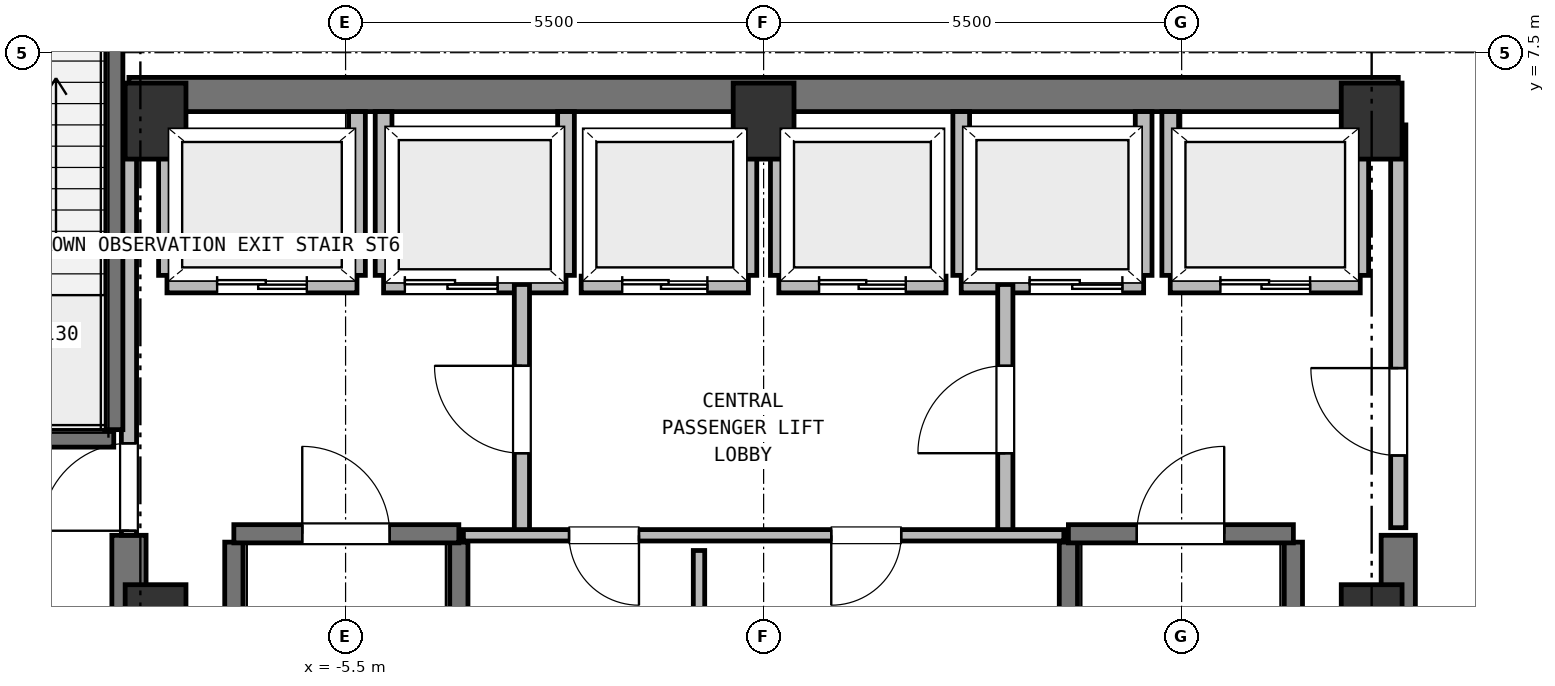
"""IFC4 building model, lengths in metres.
Left out: names, types, materials, properties, quantities, classifications, styles, units other than length and angle.
Written with IfcOpenShell. Run it as: python <this file> out.ifc"""

import sys

from ifc_helpers import new_model, si_unit, direction, frame, frame_2d, origin, origin_2d, place, context, subcontext, project, spatial, rectangle, extrude, element, fill, save


model = new_model("IFC4")
c1 = context("Model", 3, precision=1e-05, world=origin(), true_north=direction((0.0, 1.0)))
c2 = subcontext(c1, "Body", "Model", "MODEL_VIEW")
j1 = project(units=[si_unit("LENGTHUNIT", "METRE"), si_unit("PLANEANGLEUNIT", "RADIAN")], contexts=[c1])
p1 = place(None, origin())
s1 = spatial("IfcSite", under=j1, at=p1, CompositionType="ELEMENT")
p2 = place(p1, origin())
s2 = spatial("IfcBuilding", under=s1, at=p2, CompositionType="ELEMENT")
p3 = place(p2, frame((0.0, 0.0, 277.2)))
s3 = spatial("IfcBuildingStorey", under=s2, at=p3, CompositionType="ELEMENT", Elevation=277.2)
for number, where, z_axis, x_axis in (
    (1, (8.0, 0.0, 0.0), (0.0, 0.0, 1.0), (1.0, 0.0, 0.0)),
    (2, (8.0, 6.6, 0.0), (0.0, 0.0, 1.0), (1.0, 0.0, 0.0)),
    (3, (0.0, 6.6, 0.0), (0.0, 0.0, 1.0), (1.0, 0.0, 0.0)),
    (4, (-8.0, 6.6, 0.0), (0.0, 0.0, 1.0), (1.0, 0.0, 0.0)),
    (5, (-8.0, 0.0, 0.0), (0.0, 0.0, 1.0), (1.0, 0.0, 0.0)),
):
    element("IfcColumn", number, at=place(p3, frame(where, z_axis=z_axis, x_axis=x_axis)), inside=s3, PredefinedType="COLUMN", context=c2, shape_type="SweptSolid", body=[
        extrude(rectangle(XDim=0.8, YDim=1.0, at=origin_2d()), origin(), (0.0, 0.0, 1.0), 4.4),
    ])
p4 = place(p3, frame((-8.35, 6.95, 0.0), z_axis=(0.0, 0.0, 1.0), x_axis=(1.0, 0.0, 0.0)))
e6 = element("IfcWall", 6, at=p4, inside=s3, PredefinedType="SHEAR", context=c2, shape_type="SweptSolid", body=[
    extrude(rectangle(XDim=16.7, YDim=0.45, at=frame_2d((8.35, 0.0))), origin(), (0.0, 0.0, 1.0), 4.15),
])
for number, where, z_axis, x_axis in (
    (7, (-8.35, -6.95, 0.0), (0.0, 0.0, 1.0), (0.0, 1.0, 0.0)),
    (8, (8.35, -6.95, 0.0), (0.0, 0.0, 1.0), (0.0, 1.0, 0.0)),
):
    element("IfcWall", number, at=place(p3, frame(where, z_axis=z_axis, x_axis=x_axis)), inside=s3, PredefinedType="SHEAR", context=c2, shape_type="SweptSolid", body=[
        extrude(rectangle(XDim=8.1, YDim=0.45, at=frame_2d((4.05, 0.0))), origin(), (0.0, 0.0, 1.0), 4.15),
    ])
for number, where, z_axis, x_axis in (
    (9, (-6.97, -6.16, 0.0), (0.0, 0.0, 1.0), (0.0, 1.0, 0.0)),
    (10, (-4.01, -6.16, 0.0), (0.0, 0.0, 1.0), (0.0, 1.0, 0.0)),
):
    element("IfcWall", number, at=place(p3, frame(where, z_axis=z_axis, x_axis=x_axis)), inside=s3, PredefinedType="SHEAR", context=c2, shape_type="SweptSolid", body=[
        extrude(rectangle(XDim=7.22, YDim=0.24, at=frame_2d((3.61, 0.0))), origin(), (0.0, 0.0, 1.0), 4.15),
    ])
p5 = place(p3, frame((-6.97, 1.17, 0.0), z_axis=(0.0, 0.0, 1.0), x_axis=(1.0, 0.0, 0.0)))
e11 = element("IfcWall", 11, at=p5, inside=s3, PredefinedType="SHEAR", context=c2, shape_type="SweptSolid", body=[
    extrude(rectangle(XDim=2.96, YDim=0.24, at=frame_2d((1.48, 0.0))), origin(), (0.0, 0.0, 1.0), 4.15),
])
p6 = place(p5, frame((0.9, 0.0, 0.0)))
e12 = element("IfcOpeningElement", 12, at=p6, cuts=e11, PredefinedType="OPENING", context=c2, shape_type="SweptSolid", body=[
    extrude(rectangle(XDim=1.15, YDim=2.15, at=frame_2d((0.575, 1.075))), frame((0.0, 0.13, 0.0), z_axis=(0.0, -1.0, 0.0), x_axis=(1.0, 0.0, 0.0)), (0.0, 0.0, 1.0), 0.26),
])
for number, where, z_axis, x_axis in (
    (13, (4.01, -6.16, 0.0), (0.0, 0.0, 1.0), (0.0, 1.0, 0.0)),
    (14, (6.97, -6.16, 0.0), (0.0, 0.0, 1.0), (0.0, 1.0, 0.0)),
):
    element("IfcWall", number, at=place(p3, frame(where, z_axis=z_axis, x_axis=x_axis)), inside=s3, PredefinedType="SHEAR", context=c2, shape_type="SweptSolid", body=[
        extrude(rectangle(XDim=7.22, YDim=0.24, at=frame_2d((3.61, 0.0))), origin(), (0.0, 0.0, 1.0), 4.15),
    ])
p7 = place(p3, frame((4.01, 1.17, 0.0), z_axis=(0.0, 0.0, 1.0), x_axis=(1.0, 0.0, 0.0)))
e15 = element("IfcWall", 15, at=p7, inside=s3, PredefinedType="SHEAR", context=c2, shape_type="SweptSolid", body=[
    extrude(rectangle(XDim=2.96, YDim=0.24, at=frame_2d((1.48, 0.0))), origin(), (0.0, 0.0, 1.0), 4.15),
])
p8 = place(p7, frame((0.9, 0.0, 0.0)))
e16 = element("IfcOpeningElement", 16, at=p8, cuts=e15, PredefinedType="OPENING", context=c2, shape_type="SweptSolid", body=[
    extrude(rectangle(XDim=1.15, YDim=2.15, at=frame_2d((0.575, 1.075))), frame((0.0, 0.13, 0.0), z_axis=(0.0, -1.0, 0.0), x_axis=(1.0, 0.0, 0.0)), (0.0, 0.0, 1.0), 0.26),
])
p9 = place(p3, frame((-7.85, 4.45, 0.0), z_axis=(0.0, 0.0, 1.0), x_axis=(1.0, 0.0, 0.0)))
e17 = element("IfcWall", 17, at=p9, inside=s3, PredefinedType="PARTITIONING", context=c2, shape_type="SweptSolid", body=[
    extrude(rectangle(XDim=2.5, YDim=0.22, at=frame_2d((1.25, 0.0))), origin(), (0.0, 0.0, 1.0), 4.15),
])
p10 = place(p9, frame((0.66, 0.0, 0.0)))
e18 = element("IfcOpeningElement", 18, at=p10, cuts=e17, PredefinedType="OPENING", context=c2, shape_type="SweptSolid", body=[
    extrude(rectangle(XDim=1.18, YDim=2.15, at=frame_2d((0.59, 1.075))), frame((0.0, 0.12, 0.0), z_axis=(0.0, -1.0, 0.0), x_axis=(1.0, 0.0, 0.0)), (0.0, 0.0, 1.0), 0.24),
])
p11 = place(p3, frame((-7.85, 4.57, 0.0), z_axis=(0.0, 0.0, 1.0), x_axis=(0.0, 1.0, 0.0)))
e19 = element("IfcWall", 19, at=p11, inside=s3, PredefinedType="PARTITIONING", context=c2, shape_type="SweptSolid", body=[
    extrude(rectangle(XDim=2.155, YDim=0.22, at=frame_2d((1.078, 0.0))), origin(), (0.0, 0.0, 1.0), 3.83),
])
p12 = place(p3, frame((-5.35, 4.57, 0.0), z_axis=(0.0, 0.0, 1.0), x_axis=(0.0, 1.0, 0.0)))
e20 = element("IfcWall", 20, at=p12, inside=s3, PredefinedType="PARTITIONING", context=c2, shape_type="SweptSolid", body=[
    extrude(rectangle(XDim=2.155, YDim=0.22, at=frame_2d((1.078, 0.0))), origin(), (0.0, 0.0, 1.0), 4.15),
])
p13 = place(p3, frame((5.35, 4.45, 0.0), z_axis=(0.0, 0.0, 1.0), x_axis=(1.0, 0.0, 0.0)))
e21 = element("IfcWall", 21, at=p13, inside=s3, PredefinedType="PARTITIONING", context=c2, shape_type="SweptSolid", body=[
    extrude(rectangle(XDim=2.5, YDim=0.22, at=frame_2d((1.25, 0.0))), origin(), (0.0, 0.0, 1.0), 4.15),
])
p14 = place(p13, frame((0.66, 0.0, 0.0)))
e22 = element("IfcOpeningElement", 22, at=p14, cuts=e21, PredefinedType="OPENING", context=c2, shape_type="SweptSolid", body=[
    extrude(rectangle(XDim=1.18, YDim=2.15, at=frame_2d((0.59, 1.075))), frame((0.0, 0.12, 0.0), z_axis=(0.0, -1.0, 0.0), x_axis=(1.0, 0.0, 0.0)), (0.0, 0.0, 1.0), 0.24),
])
p15 = place(p3, frame((5.35, 4.57, 0.0), z_axis=(0.0, 0.0, 1.0), x_axis=(0.0, 1.0, 0.0)))
e23 = element("IfcWall", 23, at=p15, inside=s3, PredefinedType="PARTITIONING", context=c2, shape_type="SweptSolid", body=[
    extrude(rectangle(XDim=2.155, YDim=0.22, at=frame_2d((1.078, 0.0))), origin(), (0.0, 0.0, 1.0), 4.15),
])
p16 = place(p3, frame((7.85, 4.57, 0.0), z_axis=(0.0, 0.0, 1.0), x_axis=(0.0, 1.0, 0.0)))
e24 = element("IfcWall", 24, at=p16, inside=s3, PredefinedType="PARTITIONING", context=c2, shape_type="SweptSolid", body=[
    extrude(rectangle(XDim=2.155, YDim=0.22, at=frame_2d((1.078, 0.0))), origin(), (0.0, 0.0, 1.0), 3.83),
])
p17 = place(p3, frame((-5.0, 4.45, 0.0), z_axis=(0.0, 0.0, 1.0), x_axis=(1.0, 0.0, 0.0)))
e25 = element("IfcWall", 25, at=p17, inside=s3, PredefinedType="PARTITIONING", context=c2, shape_type="SweptSolid", body=[
    extrude(rectangle(XDim=2.4, YDim=0.22, at=frame_2d((1.2, 0.0))), origin(), (0.0, 0.0, 1.0), 4.15),
])
p18 = place(p17, frame((0.28, 0.0, 0.0)))
e26 = element("IfcOpeningElement", 26, at=p18, cuts=e25, PredefinedType="OPENING", context=c2, shape_type="SweptSolid", body=[
    extrude(rectangle(XDim=1.22, YDim=2.15, at=frame_2d((0.61, 1.075))), frame((0.0, 0.12, 0.0), z_axis=(0.0, -1.0, 0.0), x_axis=(1.0, 0.0, 0.0)), (0.0, 0.0, 1.0), 0.24),
])
for number, where, z_axis, x_axis in (
    (27, (-5.0, 4.57, 0.0), (0.0, 0.0, 1.0), (0.0, 1.0, 0.0)),
    (28, (-2.6, 4.57, 0.0), (0.0, 0.0, 1.0), (0.0, 1.0, 0.0)),
):
    element("IfcWall", number, at=place(p3, frame(where, z_axis=z_axis, x_axis=x_axis)), inside=s3, PredefinedType="PARTITIONING", context=c2, shape_type="SweptSolid", body=[
        extrude(rectangle(XDim=2.155, YDim=0.22, at=frame_2d((1.078, 0.0))), origin(), (0.0, 0.0, 1.0), 4.15),
    ])
p19 = place(p3, frame((2.6, 4.45, 0.0), z_axis=(0.0, 0.0, 1.0), x_axis=(1.0, 0.0, 0.0)))
e29 = element("IfcWall", 29, at=p19, inside=s3, PredefinedType="PARTITIONING", context=c2, shape_type="SweptSolid", body=[
    extrude(rectangle(XDim=2.4, YDim=0.22, at=frame_2d((1.2, 0.0))), origin(), (0.0, 0.0, 1.0), 4.15),
])
p20 = place(p19, frame((0.9, 0.0, 0.0)))
e30 = element("IfcOpeningElement", 30, at=p20, cuts=e29, PredefinedType="OPENING", context=c2, shape_type="SweptSolid", body=[
    extrude(rectangle(XDim=1.22, YDim=2.15, at=frame_2d((0.61, 1.075))), frame((0.0, 0.12, 0.0), z_axis=(0.0, -1.0, 0.0), x_axis=(1.0, 0.0, 0.0)), (0.0, 0.0, 1.0), 0.24),
])
for number, where, z_axis, x_axis in (
    (31, (2.6, 4.57, 0.0), (0.0, 0.0, 1.0), (0.0, 1.0, 0.0)),
    (32, (5.0, 4.57, 0.0), (0.0, 0.0, 1.0), (0.0, 1.0, 0.0)),
):
    element("IfcWall", number, at=place(p3, frame(where, z_axis=z_axis, x_axis=x_axis)), inside=s3, PredefinedType="PARTITIONING", context=c2, shape_type="SweptSolid", body=[
        extrude(rectangle(XDim=2.155, YDim=0.22, at=frame_2d((1.078, 0.0))), origin(), (0.0, 0.0, 1.0), 4.15),
    ])
p21 = place(p3, frame((-2.4, 4.45, 0.0), z_axis=(0.0, 0.0, 1.0), x_axis=(1.0, 0.0, 0.0)))
e33 = element("IfcWall", 33, at=p21, inside=s3, PredefinedType="PARTITIONING", context=c2, shape_type="SweptSolid", body=[
    extrude(rectangle(XDim=2.2, YDim=0.22, at=frame_2d((1.1, 0.0))), origin(), (0.0, 0.0, 1.0), 4.15),
])
p22 = place(p21, frame((0.54, 0.0, 0.0)))
e34 = element("IfcOpeningElement", 34, at=p22, cuts=e33, PredefinedType="OPENING", context=c2, shape_type="SweptSolid", body=[
    extrude(rectangle(XDim=1.12, YDim=2.15, at=frame_2d((0.56, 1.075))), frame((0.0, 0.12, 0.0), z_axis=(0.0, -1.0, 0.0), x_axis=(1.0, 0.0, 0.0)), (0.0, 0.0, 1.0), 0.24),
])
p23 = place(p3, frame((-0.2, 4.57, 0.0), z_axis=(0.0, 0.0, 1.0), x_axis=(0.0, 1.0, 0.0)))
e35 = element("IfcWall", 35, at=p23, inside=s3, PredefinedType="PARTITIONING", context=c2, shape_type="SweptSolid", body=[
    extrude(rectangle(XDim=2.155, YDim=0.22, at=frame_2d((1.078, 0.0))), origin(), (0.0, 0.0, 1.0), 4.15),
])
p24 = place(p3, frame((0.2, 4.45, 0.0), z_axis=(0.0, 0.0, 1.0), x_axis=(1.0, 0.0, 0.0)))
e36 = element("IfcWall", 36, at=p24, inside=s3, PredefinedType="PARTITIONING", context=c2, shape_type="SweptSolid", body=[
    extrude(rectangle(XDim=2.2, YDim=0.22, at=frame_2d((1.1, 0.0))), origin(), (0.0, 0.0, 1.0), 4.15),
])
p25 = place(p24, frame((0.53, 0.0, 0.0)))
e37 = element("IfcOpeningElement", 37, at=p25, cuts=e36, PredefinedType="OPENING", context=c2, shape_type="SweptSolid", body=[
    extrude(rectangle(XDim=1.14, YDim=2.15, at=frame_2d((0.57, 1.075))), frame((0.0, 0.12, 0.0), z_axis=(0.0, -1.0, 0.0), x_axis=(1.0, 0.0, 0.0)), (0.0, 0.0, 1.0), 0.24),
])
p26 = place(p3, frame((0.2, 4.57, 0.0), z_axis=(0.0, 0.0, 1.0), x_axis=(0.0, 1.0, 0.0)))
e38 = element("IfcWall", 38, at=p26, inside=s3, PredefinedType="PARTITIONING", context=c2, shape_type="SweptSolid", body=[
    extrude(rectangle(XDim=2.155, YDim=0.22, at=frame_2d((1.078, 0.0))), origin(), (0.0, 0.0, 1.0), 4.15),
])
p27 = place(p3, frame((-3.18, 1.15, 0.0), z_axis=(0.0, 0.0, 1.0), x_axis=(0.0, 1.0, 0.0)))
e39 = element("IfcWall", 39, at=p27, inside=s3, PredefinedType="PARTITIONING", context=c2, shape_type="SweptSolid", body=[
    extrude(rectangle(XDim=3.3, YDim=0.2, at=frame_2d((1.65, 0.0))), origin(), (0.0, 0.0, 1.0), 4.15),
])
p28 = place(p27, frame((1.08, 0.0, 0.0)))
e40 = element("IfcOpeningElement", 40, at=p28, cuts=e39, PredefinedType="OPENING", context=c2, shape_type="SweptSolid", body=[
    extrude(rectangle(XDim=1.15, YDim=2.15, at=frame_2d((0.575, 1.075))), frame((0.0, 0.11, 0.0), z_axis=(0.0, -1.0, 0.0), x_axis=(1.0, 0.0, 0.0)), (0.0, 0.0, 1.0), 0.22),
])
p29 = place(p3, frame((3.18, 1.15, 0.0), z_axis=(0.0, 0.0, 1.0), x_axis=(0.0, 1.0, 0.0)))
e41 = element("IfcWall", 41, at=p29, inside=s3, PredefinedType="PARTITIONING", context=c2, shape_type="SweptSolid", body=[
    extrude(rectangle(XDim=3.3, YDim=0.2, at=frame_2d((1.65, 0.0))), origin(), (0.0, 0.0, 1.0), 4.15),
])
p30 = place(p29, frame((1.08, 0.0, 0.0)))
e42 = element("IfcOpeningElement", 42, at=p30, cuts=e41, PredefinedType="OPENING", context=c2, shape_type="SweptSolid", body=[
    extrude(rectangle(XDim=1.15, YDim=2.15, at=frame_2d((0.575, 1.075))), frame((0.0, 0.11, 0.0), z_axis=(0.0, -1.0, 0.0), x_axis=(1.0, 0.0, 0.0)), (0.0, 0.0, 1.0), 0.22),
])
p31 = place(p3, frame((-8.35, 1.15, 0.0), z_axis=(0.0, 0.0, 1.0), x_axis=(0.0, 1.0, 0.0)))
e43 = element("IfcWall", 43, at=p31, inside=s3, PredefinedType="PARTITIONING", context=c2, shape_type="SweptSolid", body=[
    extrude(rectangle(XDim=5.4, YDim=0.2, at=frame_2d((2.7, 0.0))), origin(), (0.0, 0.0, 1.0), 4.15),
])
p32 = place(p31, frame((0.06, 0.0, 0.0)))
e44 = element("IfcOpeningElement", 44, at=p32, cuts=e43, PredefinedType="OPENING", context=c2, shape_type="SweptSolid", body=[
    extrude(rectangle(XDim=1.15, YDim=2.15, at=frame_2d((0.575, 1.075))), frame((0.0, 0.11, 0.0), z_axis=(0.0, -1.0, 0.0), x_axis=(1.0, 0.0, 0.0)), (0.0, 0.0, 1.0), 0.22),
])
p33 = place(p3, frame((8.35, 1.25, 0.0), z_axis=(0.0, 0.0, 1.0), x_axis=(0.0, 1.0, 0.0)))
e45 = element("IfcWall", 45, at=p33, inside=s3, PredefinedType="PARTITIONING", context=c2, shape_type="SweptSolid", body=[
    extrude(rectangle(XDim=5.3, YDim=0.2, at=frame_2d((2.65, 0.0))), origin(), (0.0, 0.0, 1.0), 4.15),
])
p34 = place(p33, frame((0.95, 0.0, 0.0)))
e46 = element("IfcOpeningElement", 46, at=p34, cuts=e45, PredefinedType="OPENING", context=c2, shape_type="SweptSolid", body=[
    extrude(rectangle(XDim=1.15, YDim=2.15, at=frame_2d((0.575, 1.075))), frame((0.0, 0.11, 0.0), z_axis=(0.0, -1.0, 0.0), x_axis=(1.0, 0.0, 0.0)), (0.0, 0.0, 1.0), 0.22),
])
p35 = place(p3, frame((3.95, 1.15, 0.0), z_axis=(0.0, 0.0, 1.0), x_axis=(-1.0, 0.0, 0.0)))
e47 = element("IfcWall", 47, at=p35, inside=s3, PredefinedType="PARTITIONING", context=c2, shape_type="SweptSolid", body=[
    extrude(rectangle(XDim=7.9, YDim=0.15, at=frame_2d((3.95, 0.0))), origin(), (0.0, 0.0, 1.0), 4.15),
])
p36 = place(p35, frame((5.59, 0.0, 0.0)))
e48 = element("IfcOpeningElement", 48, at=p36, cuts=e47, PredefinedType="OPENING", context=c2, shape_type="SweptSolid", body=[
    extrude(rectangle(XDim=0.92, YDim=2.05, at=frame_2d((0.46, 1.025))), frame((0.0, 0.085, 0.0), z_axis=(0.0, -1.0, 0.0), x_axis=(1.0, 0.0, 0.0)), (0.0, 0.0, 1.0), 0.17),
])
p37 = place(p35, frame((2.14, 0.0, 0.0)))
e49 = element("IfcOpeningElement", 49, at=p37, cuts=e47, PredefinedType="OPENING", context=c2, shape_type="SweptSolid", body=[
    extrude(rectangle(XDim=0.92, YDim=2.05, at=frame_2d((0.46, 1.025))), frame((0.0, 0.085, 0.0), z_axis=(0.0, -1.0, 0.0), x_axis=(1.0, 0.0, 0.0)), (0.0, 0.0, 1.0), 0.17),
])
p38 = place(p3, frame((-0.85, -6.58, 0.0), z_axis=(0.0, 0.0, 1.0), x_axis=(0.0, 1.0, 0.0)))
e50 = element("IfcWall", 50, at=p38, inside=s3, PredefinedType="PARTITIONING", context=c2, shape_type="SweptSolid", body=[
    extrude(rectangle(XDim=7.53, YDim=0.15, at=frame_2d((3.765, 0.0))), origin(), (0.0, 0.0, 1.0), 4.15),
])
p39 = place(p3, frame((-11.51, 2.43, 0.0), z_axis=(0.0, 0.0, 1.0), x_axis=(1.0, 0.0, 0.0)))
e51 = element("IfcWall", 51, at=p39, inside=s3, PredefinedType="SHEAR", context=c2, shape_type="SweptSolid", body=[
    extrude(rectangle(XDim=2.96, YDim=0.24, at=frame_2d((1.48, 0.0))), origin(), (0.0, 0.0, 1.0), 4.15),
])
p40 = place(p3, frame((-8.55, 2.54, 0.0), z_axis=(0.0, 0.0, 1.0), x_axis=(0.0, 1.0, 0.0)))
e52 = element("IfcWall", 52, at=p40, inside=s3, PredefinedType="SHEAR", context=c2, shape_type="SweptSolid", body=[
    extrude(rectangle(XDim=6.42, YDim=0.24, at=frame_2d((3.21, 0.0))), origin(), (0.0, 0.0, 1.0), 4.15),
])
p41 = place(p6, origin())
e53 = element("IfcDoor", 53, at=p41, inside=s3, OperationType="SINGLE_SWING_LEFT", PredefinedType="DOOR", context=c2, shape_type="SweptSolid", body=[
    extrude(rectangle(XDim=1.15, YDim=2.15, at=frame_2d((0.575, 1.075))), frame((0.0, 0.025, 0.0), z_axis=(0.0, -1.0, 0.0), x_axis=(1.0, 0.0, 0.0)), (0.0, 0.0, 1.0), 0.05),
])
fill(e12, e53)
p42 = place(p8, origin())
e54 = element("IfcDoor", 54, at=p42, inside=s3, OperationType="SINGLE_SWING_RIGHT", PredefinedType="DOOR", context=c2, shape_type="SweptSolid", body=[
    extrude(rectangle(XDim=1.15, YDim=2.15, at=frame_2d((0.575, 1.075))), frame((0.0, 0.025, 0.0), z_axis=(0.0, -1.0, 0.0), x_axis=(1.0, 0.0, 0.0)), (0.0, 0.0, 1.0), 0.05),
])
fill(e16, e54)
p43 = place(p10, origin())
e55 = element("IfcDoor", 55, at=p43, inside=s3, OperationType="DOUBLE_DOOR_SLIDING", PredefinedType="DOOR", context=c2, shape_type="SweptSolid", body=[
    extrude(rectangle(XDim=1.18, YDim=2.15, at=frame_2d((0.59, 1.075))), frame((0.0, 0.025, 0.0), z_axis=(0.0, -1.0, 0.0), x_axis=(1.0, 0.0, 0.0)), (0.0, 0.0, 1.0), 0.05),
])
fill(e18, e55)
p44 = place(p14, origin())
e56 = element("IfcDoor", 56, at=p44, inside=s3, OperationType="DOUBLE_DOOR_SLIDING", PredefinedType="DOOR", context=c2, shape_type="SweptSolid", body=[
    extrude(rectangle(XDim=1.18, YDim=2.15, at=frame_2d((0.59, 1.075))), frame((0.0, 0.025, 0.0), z_axis=(0.0, -1.0, 0.0), x_axis=(1.0, 0.0, 0.0)), (0.0, 0.0, 1.0), 0.05),
])
fill(e22, e56)
p45 = place(p18, origin())
e57 = element("IfcDoor", 57, at=p45, inside=s3, OperationType="DOUBLE_DOOR_SLIDING", PredefinedType="DOOR", context=c2, shape_type="SweptSolid", body=[
    extrude(rectangle(XDim=1.22, YDim=2.15, at=frame_2d((0.61, 1.075))), frame((0.0, 0.025, 0.0), z_axis=(0.0, -1.0, 0.0), x_axis=(1.0, 0.0, 0.0)), (0.0, 0.0, 1.0), 0.05),
])
fill(e26, e57)
p46 = place(p20, origin())
e58 = element("IfcDoor", 58, at=p46, inside=s3, OperationType="DOUBLE_DOOR_SLIDING", PredefinedType="DOOR", context=c2, shape_type="SweptSolid", body=[
    extrude(rectangle(XDim=1.22, YDim=2.15, at=frame_2d((0.61, 1.075))), frame((0.0, 0.025, 0.0), z_axis=(0.0, -1.0, 0.0), x_axis=(1.0, 0.0, 0.0)), (0.0, 0.0, 1.0), 0.05),
])
fill(e30, e58)
p47 = place(p22, origin())
e59 = element("IfcDoor", 59, at=p47, inside=s3, OperationType="DOUBLE_DOOR_SLIDING", PredefinedType="DOOR", context=c2, shape_type="SweptSolid", body=[
    extrude(rectangle(XDim=1.12, YDim=2.15, at=frame_2d((0.56, 1.075))), frame((0.0, 0.025, 0.0), z_axis=(0.0, -1.0, 0.0), x_axis=(1.0, 0.0, 0.0)), (0.0, 0.0, 1.0), 0.05),
])
fill(e34, e59)
p48 = place(p25, origin())
e60 = element("IfcDoor", 60, at=p48, inside=s3, OperationType="DOUBLE_DOOR_SLIDING", PredefinedType="DOOR", context=c2, shape_type="SweptSolid", body=[
    extrude(rectangle(XDim=1.14, YDim=2.15, at=frame_2d((0.57, 1.075))), frame((0.0, 0.025, 0.0), z_axis=(0.0, -1.0, 0.0), x_axis=(1.0, 0.0, 0.0)), (0.0, 0.0, 1.0), 0.05),
])
fill(e37, e60)
p49 = place(p28, origin())
e61 = element("IfcDoor", 61, at=p49, inside=s3, OperationType="SINGLE_SWING_RIGHT", PredefinedType="DOOR", context=c2, shape_type="SweptSolid", body=[
    extrude(rectangle(XDim=1.15, YDim=2.15, at=frame_2d((0.575, 1.075))), frame((0.0, 0.025, 0.0), z_axis=(0.0, -1.0, 0.0), x_axis=(1.0, 0.0, 0.0)), (0.0, 0.0, 1.0), 0.05),
])
fill(e40, e61)
p50 = place(p30, origin())
e62 = element("IfcDoor", 62, at=p50, inside=s3, OperationType="SINGLE_SWING_LEFT", PredefinedType="DOOR", context=c2, shape_type="SweptSolid", body=[
    extrude(rectangle(XDim=1.15, YDim=2.15, at=frame_2d((0.575, 1.075))), frame((0.0, 0.025, 0.0), z_axis=(0.0, -1.0, 0.0), x_axis=(1.0, 0.0, 0.0)), (0.0, 0.0, 1.0), 0.05),
])
fill(e42, e62)
p51 = place(p32, origin())
e63 = element("IfcDoor", 63, at=p51, inside=s3, OperationType="SINGLE_SWING_LEFT", PredefinedType="DOOR", context=c2, shape_type="SweptSolid", body=[
    extrude(rectangle(XDim=1.15, YDim=2.15, at=frame_2d((0.575, 1.075))), frame((0.0, 0.025, 0.0), z_axis=(0.0, -1.0, 0.0), x_axis=(1.0, 0.0, 0.0)), (0.0, 0.0, 1.0), 0.05),
])
fill(e44, e63)
p52 = place(p34, origin())
e64 = element("IfcDoor", 64, at=p52, inside=s3, OperationType="SINGLE_SWING_RIGHT", PredefinedType="DOOR", context=c2, shape_type="SweptSolid", body=[
    extrude(rectangle(XDim=1.15, YDim=2.15, at=frame_2d((0.575, 1.075))), frame((0.0, 0.025, 0.0), z_axis=(0.0, -1.0, 0.0), x_axis=(1.0, 0.0, 0.0)), (0.0, 0.0, 1.0), 0.05),
])
fill(e46, e64)
p53 = place(p36, origin())
e65 = element("IfcDoor", 65, at=p53, inside=s3, OperationType="SINGLE_SWING_LEFT", PredefinedType="DOOR", context=c2, shape_type="SweptSolid", body=[
    extrude(rectangle(XDim=0.92, YDim=2.05, at=frame_2d((0.46, 1.025))), frame((0.0, 0.025, 0.0), z_axis=(0.0, -1.0, 0.0), x_axis=(1.0, 0.0, 0.0)), (0.0, 0.0, 1.0), 0.05),
])
fill(e48, e65)
p54 = place(p37, origin())
e66 = element("IfcDoor", 66, at=p54, inside=s3, OperationType="SINGLE_SWING_RIGHT", PredefinedType="DOOR", context=c2, shape_type="SweptSolid", body=[
    extrude(rectangle(XDim=0.92, YDim=2.05, at=frame_2d((0.46, 1.025))), frame((0.0, 0.025, 0.0), z_axis=(0.0, -1.0, 0.0), x_axis=(1.0, 0.0, 0.0)), (0.0, 0.0, 1.0), 0.05),
])
fill(e49, e66)
save(model, sys.argv[1])
